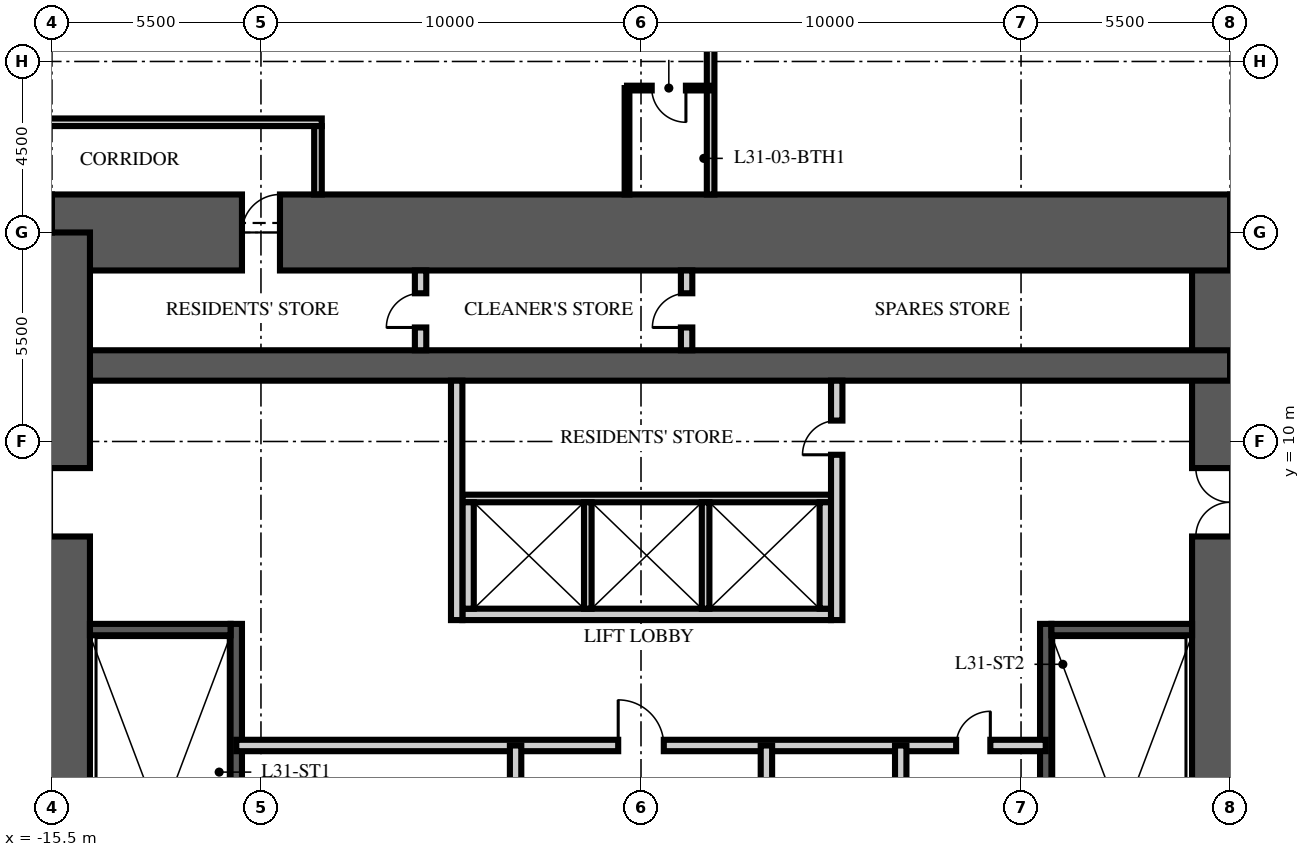
"""IFC4 building model, lengths in metres.
Left out: names, types, materials, properties, quantities, classifications, styles, units other than length and angle.
Written with IfcOpenShell. Run it as: python <this file> out.ifc"""

import sys

from ifc_helpers import new_model, si_unit, direction, frame, frame_2d, origin, place, context, subcontext, project, spatial, rectangle, extrude, element, fill, save


model = new_model("IFC4")
c1 = context("Model", 3, precision=1e-05, world=origin(), true_north=direction((0.0, 1.0)))
c2 = subcontext(c1, "Body", "Model", "MODEL_VIEW")
j1 = project(units=[si_unit("LENGTHUNIT", "METRE"), si_unit("PLANEANGLEUNIT", "RADIAN")], contexts=[c1])
p1 = place(None, origin())
s1 = spatial("IfcSite", under=j1, at=p1, CompositionType="ELEMENT")
p2 = place(p1, origin())
s2 = spatial("IfcBuilding", under=s1, at=p2, CompositionType="ELEMENT")
p3 = place(p2, frame((0.0, 0.0, 126.0)))
s3 = spatial("IfcBuildingStorey", under=s2, at=p3, CompositionType="ELEMENT", Elevation=126.0)
p4 = place(p3, frame((15.5, -15.5, -0.25), z_axis=(0.0, 0.0, 1.0), x_axis=(0.0, 1.0, 0.0)))
e1 = element("IfcWall", 1, at=p4, inside=s3, PredefinedType="SHEAR", context=c2, shape_type="SweptSolid", body=[
    extrude(rectangle(XDim=31.0, YDim=2.0, at=frame_2d((15.5, 0.0))), origin(), (0.0, 0.0, 1.0), 3.75),
])
p5 = place(p4, frame((6.5, 0.0, 0.25)))
e2 = element("IfcOpeningElement", 2, at=p5, cuts=e1, PredefinedType="OPENING", context=c2, shape_type="SweptSolid", body=[
    extrude(rectangle(XDim=1.2, YDim=2.1, at=frame_2d((0.6, 1.05))), frame((0.0, 1.01, 0.0), z_axis=(0.0, -1.0, 0.0), x_axis=(1.0, 0.0, 0.0)), (0.0, 0.0, 1.0), 2.02),
])
p6 = place(p4, frame((23.0, 0.0, 0.25)))
e3 = element("IfcOpeningElement", 3, at=p6, cuts=e1, PredefinedType="OPENING", context=c2, shape_type="SweptSolid", body=[
    extrude(rectangle(XDim=1.8, YDim=2.1, at=frame_2d((0.9, 1.05))), frame((0.0, 1.01, 0.0), z_axis=(0.0, -1.0, 0.0), x_axis=(1.0, 0.0, 0.0)), (0.0, 0.0, 1.0), 2.02),
])
p7 = place(p3, frame((-15.5, 15.5, -0.25), z_axis=(0.0, 0.0, 1.0), x_axis=(1.0, 0.0, 0.0)))
e4 = element("IfcWall", 4, at=p7, inside=s3, PredefinedType="SHEAR", context=c2, shape_type="SweptSolid", body=[
    extrude(rectangle(XDim=31.0, YDim=2.0, at=frame_2d((15.5, 0.0))), origin(), (0.0, 0.0, 1.0), 3.75),
])
p8 = place(p7, frame((5.0, 0.0, 0.25)))
e5 = element("IfcOpeningElement", 5, at=p8, cuts=e4, PredefinedType="OPENING", context=c2, shape_type="SweptSolid", body=[
    extrude(rectangle(XDim=1.0, YDim=2.1, at=frame_2d((0.5, 1.05))), frame((0.0, 1.01, 0.0), z_axis=(0.0, -1.0, 0.0), x_axis=(1.0, 0.0, 0.0)), (0.0, 0.0, 1.0), 2.02),
])
p9 = place(p3, frame((-15.5, 12.0, -0.25), z_axis=(0.0, 0.0, 1.0), x_axis=(1.0, 0.0, 0.0)))
e6 = element("IfcWall", 6, at=p9, inside=s3, PredefinedType="SHEAR", context=c2, shape_type="SweptSolid", body=[
    extrude(rectangle(XDim=31.0, YDim=0.8, at=frame_2d((15.5, 0.0))), origin(), (0.0, 0.0, 1.0), 3.75),
])
p10 = place(p3, frame((-15.5, -15.5, -0.25), z_axis=(0.0, 0.0, 1.0), x_axis=(0.0, 1.0, 0.0)))
e7 = element("IfcWall", 7, at=p10, inside=s3, PredefinedType="SHEAR", context=c2, shape_type="SweptSolid", body=[
    extrude(rectangle(XDim=31.0, YDim=2.0, at=frame_2d((15.5, 0.0))), origin(), (0.0, 0.0, 1.0), 3.75),
])
p11 = place(p10, frame((6.5, 0.0, 0.25)))
e8 = element("IfcOpeningElement", 8, at=p11, cuts=e7, PredefinedType="OPENING", context=c2, shape_type="SweptSolid", body=[
    extrude(rectangle(XDim=1.2, YDim=2.1, at=frame_2d((0.6, 1.05))), frame((0.0, 1.01, 0.0), z_axis=(0.0, -1.0, 0.0), x_axis=(1.0, 0.0, 0.0)), (0.0, 0.0, 1.0), 2.02),
])
p12 = place(p10, frame((23.0, 0.0, 0.25)))
e9 = element("IfcOpeningElement", 9, at=p12, cuts=e7, PredefinedType="OPENING", context=c2, shape_type="SweptSolid", body=[
    extrude(rectangle(XDim=1.8, YDim=2.1, at=frame_2d((0.9, 1.05))), frame((0.0, 1.01, 0.0), z_axis=(0.0, -1.0, 0.0), x_axis=(1.0, 0.0, 0.0)), (0.0, 0.0, 1.0), 2.02),
])
p13 = place(p3, frame((-10.65, -4.9, 0.0), z_axis=(0.0, 0.0, 1.0), x_axis=(0.0, 1.0, 0.0)))
e10 = element("IfcWall", 10, at=p13, inside=s3, PredefinedType="SOLIDWALL", context=c2, shape_type="SweptSolid", body=[
    extrude(rectangle(XDim=10.1, YDim=0.3, at=frame_2d((5.05, 0.0))), origin(), (0.0, 0.0, 1.0), 3.5),
])
p14 = place(p3, frame((-14.5, 5.05, 0.0), z_axis=(0.0, 0.0, 1.0), x_axis=(1.0, 0.0, 0.0)))
e11 = element("IfcWall", 11, at=p14, inside=s3, PredefinedType="SOLIDWALL", context=c2, shape_type="SweptSolid", body=[
    extrude(rectangle(XDim=3.7, YDim=0.3, at=frame_2d((1.85, 0.0))), origin(), (0.0, 0.0, 1.0), 3.5),
])
p15 = place(p3, frame((10.65, -4.9, 0.0), z_axis=(0.0, 0.0, 1.0), x_axis=(0.0, 1.0, 0.0)))
e12 = element("IfcWall", 12, at=p15, inside=s3, PredefinedType="SOLIDWALL", context=c2, shape_type="SweptSolid", body=[
    extrude(rectangle(XDim=10.1, YDim=0.3, at=frame_2d((5.05, 0.0))), origin(), (0.0, 0.0, 1.0), 3.5),
])
p16 = place(p3, frame((14.5, 5.05, 0.0), z_axis=(0.0, 0.0, 1.0), x_axis=(-1.0, 0.0, 0.0)))
e13 = element("IfcWall", 13, at=p16, inside=s3, PredefinedType="SOLIDWALL", context=c2, shape_type="SweptSolid", body=[
    extrude(rectangle(XDim=3.7, YDim=0.3, at=frame_2d((1.85, 0.0))), origin(), (0.0, 0.0, 1.0), 3.5),
])
p17 = place(p3, frame((-4.7, 5.45, 0.0), z_axis=(0.0, 0.0, 1.0), x_axis=(1.0, 0.0, 0.0)))
e14 = element("IfcWall", 14, at=p17, inside=s3, PredefinedType="PARTITIONING", context=c2, shape_type="SweptSolid", body=[
    extrude(rectangle(XDim=9.7, YDim=0.3, at=frame_2d((4.85, 0.0))), origin(), (0.0, 0.0, 1.0), 3.5),
])
p18 = place(p3, frame((-4.7, 8.5, 0.0), z_axis=(0.0, 0.0, 1.0), x_axis=(1.0, 0.0, 0.0)))
e15 = element("IfcWall", 15, at=p18, inside=s3, PredefinedType="PARTITIONING", context=c2, shape_type="SweptSolid", body=[
    extrude(rectangle(XDim=9.7, YDim=0.2, at=frame_2d((4.85, 0.0))), origin(), (0.0, 0.0, 1.0), 3.5),
])
for number, where, z_axis, x_axis in (
    (16, (-4.55, 5.6, 0.0), (0.0, 0.0, 1.0), (0.0, 1.0, 0.0)),
    (17, (4.85, 5.6, 0.0), (0.0, 0.0, 1.0), (0.0, 1.0, 0.0)),
):
    element("IfcWall", number, at=place(p3, frame(where, z_axis=z_axis, x_axis=x_axis)), inside=s3, PredefinedType="PARTITIONING", context=c2, shape_type="SweptSolid", body=[
        extrude(rectangle(XDim=2.8, YDim=0.3, at=frame_2d((1.4, 0.0))), origin(), (0.0, 0.0, 1.0), 3.5),
    ])
for number, where, z_axis, x_axis in (
    (18, (-1.4, 5.6, 0.0), (0.0, 0.0, 1.0), (0.0, 1.0, 0.0)),
    (19, (1.7, 5.6, 0.0), (0.0, 0.0, 1.0), (0.0, 1.0, 0.0)),
):
    element("IfcWall", number, at=place(p3, frame(where, z_axis=z_axis, x_axis=x_axis)), inside=s3, PredefinedType="PARTITIONING", context=c2, shape_type="SweptSolid", body=[
        extrude(rectangle(XDim=2.8, YDim=0.2, at=frame_2d((1.4, 0.0))), origin(), (0.0, 0.0, 1.0), 3.5),
    ])
p19 = place(p3, frame((-10.65, 2.0, 0.0), z_axis=(0.0, 0.0, 1.0), x_axis=(1.0, 0.0, 0.0)))
e20 = element("IfcWall", 20, at=p19, inside=s3, PredefinedType="PARTITIONING", context=c2, shape_type="SweptSolid", body=[
    extrude(rectangle(XDim=21.3, YDim=0.3, at=frame_2d((10.65, 0.0))), origin(), (0.0, 0.0, 1.0), 3.5),
])
p20 = place(p19, frame((10.05, 0.0, 0.0)))
e21 = element("IfcOpeningElement", 21, at=p20, cuts=e20, PredefinedType="OPENING", context=c2, shape_type="SweptSolid", body=[
    extrude(rectangle(XDim=1.2, YDim=2.1, at=frame_2d((0.6, 1.05))), frame((0.0, 0.16, 0.0), z_axis=(0.0, -1.0, 0.0), x_axis=(1.0, 0.0, 0.0)), (0.0, 0.0, 1.0), 0.32),
])
p21 = place(p19, frame((18.942, 0.0, 0.0)))
e22 = element("IfcOpeningElement", 22, at=p21, cuts=e20, PredefinedType="OPENING", context=c2, shape_type="SweptSolid", body=[
    extrude(rectangle(XDim=0.9, YDim=2.1, at=frame_2d((0.45, 1.05))), frame((0.0, 0.16, 0.0), z_axis=(0.0, -1.0, 0.0), x_axis=(1.0, 0.0, 0.0)), (0.0, 0.0, 1.0), 0.32),
])
p22 = place(p3, frame((-3.3, -6.65, 0.0), z_axis=(0.0, 0.0, 1.0), x_axis=(0.0, 1.0, 0.0)))
e23 = element("IfcWall", 23, at=p22, inside=s3, PredefinedType="PARTITIONING", context=c2, shape_type="SweptSolid", body=[
    extrude(rectangle(XDim=8.65, YDim=0.3, at=frame_2d((4.325, 0.0))), origin(), (0.0, 0.0, 1.0), 3.5),
])
p23 = place(p22, frame((1.75, 0.0, 0.0)))
e24 = element("IfcOpeningElement", 24, at=p23, cuts=e23, PredefinedType="OPENING", context=c2, shape_type="SweptSolid", body=[
    extrude(rectangle(XDim=0.9, YDim=2.1, at=frame_2d((0.45, 1.05))), frame((0.0, 0.16, 0.0), z_axis=(0.0, -1.0, 0.0), x_axis=(1.0, 0.0, 0.0)), (0.0, 0.0, 1.0), 0.32),
])
p24 = place(p22, frame((6.075, 0.0, 0.0)))
e25 = element("IfcOpeningElement", 25, at=p24, cuts=e23, PredefinedType="OPENING", context=c2, shape_type="SweptSolid", body=[
    extrude(rectangle(XDim=0.9, YDim=2.1, at=frame_2d((0.45, 1.05))), frame((0.0, 0.16, 0.0), z_axis=(0.0, -1.0, 0.0), x_axis=(1.0, 0.0, 0.0)), (0.0, 0.0, 1.0), 0.32),
])
p25 = place(p3, frame((3.3, -6.65, 0.0), z_axis=(0.0, 0.0, 1.0), x_axis=(0.0, 1.0, 0.0)))
e26 = element("IfcWall", 26, at=p25, inside=s3, PredefinedType="PARTITIONING", context=c2, shape_type="SweptSolid", body=[
    extrude(rectangle(XDim=8.65, YDim=0.3, at=frame_2d((4.325, 0.0))), origin(), (0.0, 0.0, 1.0), 3.5),
])
p26 = place(p25, frame((3.875, 0.0, 0.0)))
e27 = element("IfcOpeningElement", 27, at=p26, cuts=e26, PredefinedType="OPENING", context=c2, shape_type="SweptSolid", body=[
    extrude(rectangle(XDim=0.9, YDim=2.1, at=frame_2d((0.45, 1.05))), frame((0.0, 0.16, 0.0), z_axis=(0.0, -1.0, 0.0), x_axis=(1.0, 0.0, 0.0)), (0.0, 0.0, 1.0), 0.32),
])
p27 = place(p3, frame((6.834, -6.65, 0.0), z_axis=(0.0, 0.0, 1.0), x_axis=(0.0, 1.0, 0.0)))
e28 = element("IfcWall", 28, at=p27, inside=s3, PredefinedType="PARTITIONING", context=c2, shape_type="SweptSolid", body=[
    extrude(rectangle(XDim=8.65, YDim=0.3, at=frame_2d((4.325, 0.0))), origin(), (0.0, 0.0, 1.0), 3.5),
])
p28 = place(p3, frame((-4.85, 5.3, 0.0), z_axis=(0.0, 0.0, 1.0), x_axis=(0.0, 1.0, 0.0)))
e29 = element("IfcWall", 29, at=p28, inside=s3, PredefinedType="PARTITIONING", context=c2, shape_type="SweptSolid", body=[
    extrude(rectangle(XDim=6.3, YDim=0.3, at=frame_2d((3.15, 0.0))), origin(), (0.0, 0.0, 1.0), 3.5),
])
p29 = place(p3, frame((5.15, 5.3, 0.0), z_axis=(0.0, 0.0, 1.0), x_axis=(0.0, 1.0, 0.0)))
e30 = element("IfcWall", 30, at=p29, inside=s3, PredefinedType="PARTITIONING", context=c2, shape_type="SweptSolid", body=[
    extrude(rectangle(XDim=6.3, YDim=0.3, at=frame_2d((3.15, 0.0))), origin(), (0.0, 0.0, 1.0), 3.5),
])
p30 = place(p29, frame((4.35, 0.0, 0.0)))
e31 = element("IfcOpeningElement", 31, at=p30, cuts=e30, PredefinedType="OPENING", context=c2, shape_type="SweptSolid", body=[
    extrude(rectangle(XDim=0.9, YDim=2.1, at=frame_2d((0.45, 1.05))), frame((0.0, 0.16, 0.0), z_axis=(0.0, -1.0, 0.0), x_axis=(1.0, 0.0, 0.0)), (0.0, 0.0, 1.0), 0.32),
])
p31 = place(p3, frame((-5.8, 12.4, 0.0), z_axis=(0.0, 0.0, 1.0), x_axis=(0.0, 1.0, 0.0)))
e32 = element("IfcWall", 32, at=p31, inside=s3, PredefinedType="PARTITIONING", context=c2, shape_type="SweptSolid", body=[
    extrude(rectangle(XDim=2.1, YDim=0.3, at=frame_2d((1.05, 0.0))), origin(), (0.0, 0.0, 1.0), 3.5),
])
p32 = place(p31, frame((0.6, 0.0, 0.0)))
e33 = element("IfcOpeningElement", 33, at=p32, cuts=e32, PredefinedType="OPENING", context=c2, shape_type="SweptSolid", body=[
    extrude(rectangle(XDim=0.9, YDim=2.1, at=frame_2d((0.45, 1.05))), frame((0.0, 0.16, 0.0), z_axis=(0.0, -1.0, 0.0), x_axis=(1.0, 0.0, 0.0)), (0.0, 0.0, 1.0), 0.32),
])
p33 = place(p3, frame((1.2, 12.4, 0.0), z_axis=(0.0, 0.0, 1.0), x_axis=(0.0, 1.0, 0.0)))
e34 = element("IfcWall", 34, at=p33, inside=s3, PredefinedType="PARTITIONING", context=c2, shape_type="SweptSolid", body=[
    extrude(rectangle(XDim=2.1, YDim=0.3, at=frame_2d((1.05, 0.0))), origin(), (0.0, 0.0, 1.0), 3.5),
])
p34 = place(p33, frame((0.6, 0.0, 0.0)))
e35 = element("IfcOpeningElement", 35, at=p34, cuts=e34, PredefinedType="OPENING", context=c2, shape_type="SweptSolid", body=[
    extrude(rectangle(XDim=0.9, YDim=2.1, at=frame_2d((0.45, 1.05))), frame((0.0, 0.16, 0.0), z_axis=(0.0, -1.0, 0.0), x_axis=(1.0, 0.0, 0.0)), (0.0, 0.0, 1.0), 0.32),
])
p35 = place(p3, frame((-18.5, 18.4, 0.0), z_axis=(0.0, 0.0, 1.0), x_axis=(1.0, 0.0, 0.0)))
e36 = element("IfcWall", 36, at=p35, inside=s3, PredefinedType="PARTITIONING", context=c2, shape_type="SweptSolid", body=[
    extrude(rectangle(XDim=10.1, YDim=0.2, at=frame_2d((5.05, 0.0))), origin(), (0.0, 0.0, 1.0), 2.3),
])
p36 = place(p3, frame((-8.5, 18.3, 0.0), z_axis=(0.0, 0.0, 1.0), x_axis=(0.0, -1.0, 0.0)))
e37 = element("IfcWall", 37, at=p36, inside=s3, PredefinedType="PARTITIONING", context=c2, shape_type="SweptSolid", body=[
    extrude(rectangle(XDim=1.8, YDim=0.2, at=frame_2d((0.9, 0.0))), origin(), (0.0, 0.0, 1.0), 3.5),
])
p37 = place(p3, frame((1.832, 16.5, 0.0), z_axis=(0.0, 0.0, 1.0), x_axis=(0.0, 1.0, 0.0)))
e38 = element("IfcWall", 38, at=p37, inside=s3, PredefinedType="PARTITIONING", context=c2, shape_type="SweptSolid", body=[
    extrude(rectangle(XDim=12.4, YDim=0.2, at=frame_2d((6.2, 0.0))), origin(), (0.0, 0.0, 1.0), 2.81),
])
p38 = place(p3, frame((1.832, 19.3, 0.0), z_axis=(0.0, 0.0, 1.0), x_axis=(-1.0, 0.0, 0.0)))
e39 = element("IfcWall", 39, at=p38, inside=s3, PredefinedType="PARTITIONING", context=c2, shape_type="SweptSolid", body=[
    extrude(rectangle(XDim=2.2, YDim=0.125, at=frame_2d((1.1, 0.0))), origin(), (0.0, 0.0, 1.0), 2.7),
])
p39 = place(p38, frame((0.65, 0.0, 0.0)))
e40 = element("IfcOpeningElement", 40, at=p39, cuts=e39, PredefinedType="OPENING", context=c2, shape_type="SweptSolid", body=[
    extrude(rectangle(XDim=0.9, YDim=2.1, at=frame_2d((0.45, 1.05))), frame((0.0, 0.073, 0.0), z_axis=(0.0, -1.0, 0.0), x_axis=(1.0, 0.0, 0.0)), (0.0, 0.0, 1.0), 0.145),
])
p40 = place(p3, frame((-0.368, 16.5, 0.0), z_axis=(0.0, 0.0, 1.0), x_axis=(0.0, 1.0, 0.0)))
e41 = element("IfcWall", 41, at=p40, inside=s3, PredefinedType="PARTITIONING", context=c2, shape_type="SweptSolid", body=[
    extrude(rectangle(XDim=2.8, YDim=0.125, at=frame_2d((1.4, 0.0))), origin(), (0.0, 0.0, 1.0), 3.5),
])
p41 = place(p12, origin())
e42 = element("IfcDoor", 42, at=p41, inside=s3, OperationType="DOUBLE_DOOR_SINGLE_SWING", PredefinedType="DOOR", context=c2, shape_type="SweptSolid", body=[
    extrude(rectangle(XDim=1.8, YDim=2.1, at=frame_2d((0.9, 1.05))), frame((0.0, 0.025, 0.0), z_axis=(0.0, -1.0, 0.0), x_axis=(1.0, 0.0, 0.0)), (0.0, 0.0, 1.0), 0.05),
])
fill(e9, e42)
p42 = place(p6, origin())
e43 = element("IfcDoor", 43, at=p42, inside=s3, OperationType="DOUBLE_DOOR_SINGLE_SWING", PredefinedType="DOOR", context=c2, shape_type="SweptSolid", body=[
    extrude(rectangle(XDim=1.8, YDim=2.1, at=frame_2d((0.9, 1.05))), frame((0.0, 0.025, 0.0), z_axis=(0.0, -1.0, 0.0), x_axis=(1.0, 0.0, 0.0)), (0.0, 0.0, 1.0), 0.05),
])
fill(e3, e43)
p43 = place(p20, origin())
e44 = element("IfcDoor", 44, at=p43, inside=s3, OperationType="SINGLE_SWING_LEFT", PredefinedType="DOOR", context=c2, shape_type="SweptSolid", body=[
    extrude(rectangle(XDim=1.2, YDim=2.1, at=frame_2d((0.6, 1.05))), frame((0.0, 0.025, 0.0), z_axis=(0.0, -1.0, 0.0), x_axis=(1.0, 0.0, 0.0)), (0.0, 0.0, 1.0), 0.05),
])
fill(e21, e44)
p44 = place(p21, origin())
e45 = element("IfcDoor", 45, at=p44, inside=s3, OperationType="SINGLE_SWING_RIGHT", PredefinedType="DOOR", context=c2, shape_type="SweptSolid", body=[
    extrude(rectangle(XDim=0.9, YDim=2.1, at=frame_2d((0.45, 1.05))), frame((0.0, 0.025, 0.0), z_axis=(0.0, -1.0, 0.0), x_axis=(1.0, 0.0, 0.0)), (0.0, 0.0, 1.0), 0.05),
])
fill(e22, e45)
p45 = place(p30, origin())
e46 = element("IfcDoor", 46, at=p45, inside=s3, OperationType="SINGLE_SWING_LEFT", PredefinedType="DOOR", context=c2, shape_type="SweptSolid", body=[
    extrude(rectangle(XDim=0.9, YDim=2.1, at=frame_2d((0.45, 1.05))), frame((0.0, 0.025, 0.0), z_axis=(0.0, -1.0, 0.0), x_axis=(1.0, 0.0, 0.0)), (0.0, 0.0, 1.0), 0.05),
])
fill(e31, e46)
p46 = place(p32, origin())
e47 = element("IfcDoor", 47, at=p46, inside=s3, OperationType="SINGLE_SWING_LEFT", PredefinedType="DOOR", context=c2, shape_type="SweptSolid", body=[
    extrude(rectangle(XDim=0.9, YDim=2.1, at=frame_2d((0.45, 1.05))), frame((0.0, 0.025, 0.0), z_axis=(0.0, -1.0, 0.0), x_axis=(1.0, 0.0, 0.0)), (0.0, 0.0, 1.0), 0.05),
])
fill(e33, e47)
p47 = place(p34, origin())
e48 = element("IfcDoor", 48, at=p47, inside=s3, OperationType="SINGLE_SWING_LEFT", PredefinedType="DOOR", context=c2, shape_type="SweptSolid", body=[
    extrude(rectangle(XDim=0.9, YDim=2.1, at=frame_2d((0.45, 1.05))), frame((0.0, 0.025, 0.0), z_axis=(0.0, -1.0, 0.0), x_axis=(1.0, 0.0, 0.0)), (0.0, 0.0, 1.0), 0.05),
])
fill(e35, e48)
p48 = place(p8, origin())
e49 = element("IfcDoor", 49, at=p48, inside=s3, OperationType="SINGLE_SWING_RIGHT", PredefinedType="DOOR", context=c2, shape_type="SweptSolid", body=[
    extrude(rectangle(XDim=1.0, YDim=2.1, at=frame_2d((0.5, 1.05))), frame((0.0, 0.025, 0.0), z_axis=(0.0, -1.0, 0.0), x_axis=(1.0, 0.0, 0.0)), (0.0, 0.0, 1.0), 0.05),
])
fill(e5, e49)
p49 = place(p39, origin())
e50 = element("IfcDoor", 50, at=p49, inside=s3, OperationType="SINGLE_SWING_LEFT", PredefinedType="DOOR", context=c2, shape_type="SweptSolid", body=[
    extrude(rectangle(XDim=0.9, YDim=2.1, at=frame_2d((0.45, 1.05))), frame((0.0, 0.025, 0.0), z_axis=(0.0, -1.0, 0.0), x_axis=(1.0, 0.0, 0.0)), (0.0, 0.0, 1.0), 0.05),
])
fill(e40, e50)
save(model, sys.argv[1])
